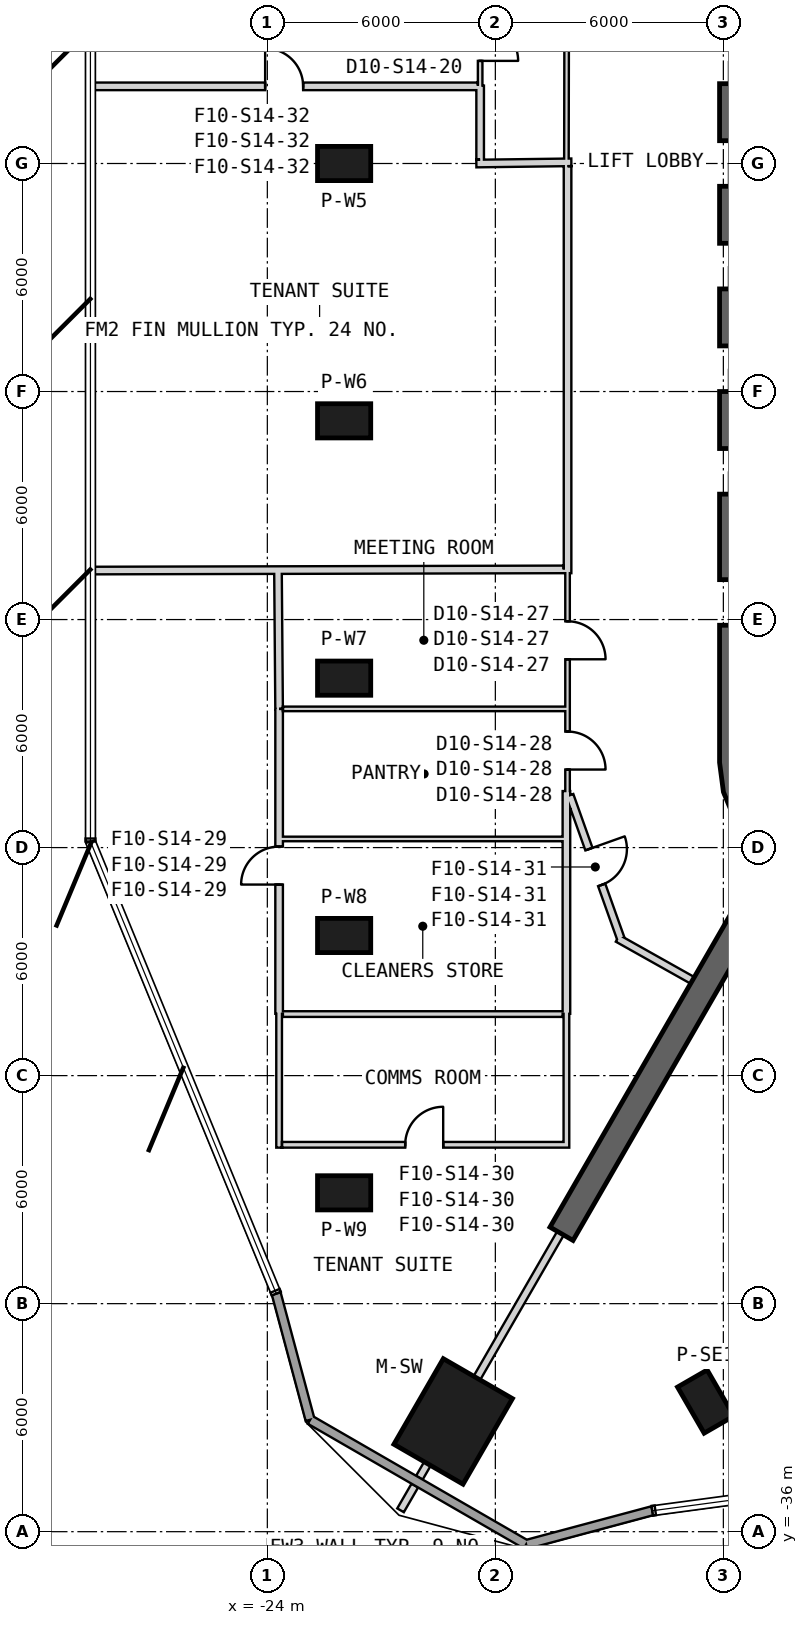
"""IFC4 building model, lengths in metres.
Left out: names, types, materials, properties, quantities, classifications, styles, units other than length and angle.
Written with IfcOpenShell. Run it as: python <this file> out.ifc"""

import sys

from ifc_helpers import new_model, si_unit, direction, frame, frame_2d, origin, origin_2d, place, context, subcontext, project, spatial, polyline, rectangle, outline, extrude, element, fill, save


model = new_model("IFC4")
c1 = context("Model", 3, precision=1e-05, world=origin(), true_north=direction((0.0, 1.0)))
c2 = subcontext(c1, "Body", "Model", "MODEL_VIEW")
j1 = project(units=[si_unit("LENGTHUNIT", "METRE"), si_unit("PLANEANGLEUNIT", "RADIAN")], contexts=[c1])
p1 = place(None, origin())
s1 = spatial("IfcSite", under=j1, at=p1, CompositionType="ELEMENT")
p2 = place(p1, origin())
s2 = spatial("IfcBuilding", under=s1, at=p2, CompositionType="ELEMENT")
p3 = place(p2, frame((0.0, 0.0, 229.2)))
s3 = spatial("IfcBuildingStorey", under=s2, at=p3, CompositionType="ELEMENT", Elevation=229.2)
p4 = place(p3, frame((-19.11, -33.099, 0.0), z_axis=(0.0, 0.0, 1.0), x_axis=(-0.5, -0.866025403784, 0.0)))
e1 = element("IfcColumn", 1, at=p4, inside=s3, PredefinedType="COLUMN", context=c2, shape_type="SweptSolid", body=[
    extrude(rectangle(XDim=2.6, YDim=2.1, at=origin_2d()), origin(), (0.0, 0.0, 1.0), 4.0),
])
for number, where, z_axis, x_axis in (
    (2, (-21.979, 0.0, 0.0), (0.0, 0.0, 1.0), (-1.0, 0.0, 0.0)),
    (3, (-21.979, -6.771, 0.0), (0.0, 0.0, 1.0), (-1.0, 0.0, 0.0)),
    (4, (-21.979, -13.542, 0.0), (0.0, 0.0, 1.0), (-1.0, 0.0, 0.0)),
    (5, (-21.979, -20.313, 0.0), (0.0, 0.0, 1.0), (-1.0, 0.0, 0.0)),
    (6, (-21.979, -27.084, 0.0), (0.0, 0.0, 1.0), (-1.0, 0.0, 0.0)),
    (7, (-12.466, -32.576, 0.0), (0.0, 0.0, 1.0), (0.5, -0.866, 0.0)),
):
    element("IfcColumn", number, at=place(p3, frame(where, z_axis=z_axis, x_axis=x_axis)), inside=s3, PredefinedType="COLUMN", context=c2, shape_type="SweptSolid", body=[
        extrude(rectangle(XDim=1.4, YDim=0.9, at=origin_2d()), origin(), (0.0, 0.0, 1.0), 4.0),
    ])
p5 = place(p3, frame((-11.65, 15.762, 0.0), z_axis=(0.0, 0.0, 1.0), x_axis=(0.0, -1.0, 0.0)))
e8 = element("IfcWall", 8, at=p5, inside=s3, PredefinedType="SHEAR", context=c2, shape_type="SweptSolid", body=[
    extrude(rectangle(XDim=31.523, YDim=0.9, at=frame_2d((15.762, 0.0))), origin(), (0.0, 0.0, 1.0), 4.0),
])
p6 = place(p5, frame((7.062, 0.0, 0.0)))
e9 = element("IfcOpeningElement", 9, at=p6, cuts=e8, PredefinedType="OPENING", context=c2, shape_type="SweptSolid", body=[
    extrude(rectangle(XDim=1.2, YDim=2.4, at=frame_2d((0.6, 1.2))), frame((0.0, 0.46, 0.0), z_axis=(0.0, -1.0, 0.0), x_axis=(1.0, 0.0, 0.0)), (0.0, 0.0, 1.0), 0.92),
])
p7 = place(p5, frame((9.762, 0.0, 0.0)))
e10 = element("IfcOpeningElement", 10, at=p7, cuts=e8, PredefinedType="OPENING", context=c2, shape_type="SweptSolid", body=[
    extrude(rectangle(XDim=1.2, YDim=2.4, at=frame_2d((0.6, 1.2))), frame((0.0, 0.46, 0.0), z_axis=(0.0, -1.0, 0.0), x_axis=(1.0, 0.0, 0.0)), (0.0, 0.0, 1.0), 0.92),
])
p8 = place(p5, frame((12.462, 0.0, 0.0)))
e11 = element("IfcOpeningElement", 11, at=p8, cuts=e8, PredefinedType="OPENING", context=c2, shape_type="SweptSolid", body=[
    extrude(rectangle(XDim=1.2, YDim=2.4, at=frame_2d((0.6, 1.2))), frame((0.0, 0.46, 0.0), z_axis=(0.0, -1.0, 0.0), x_axis=(1.0, 0.0, 0.0)), (0.0, 0.0, 1.0), 0.92),
])
p9 = place(p5, frame((15.162, 0.0, 0.0)))
e12 = element("IfcOpeningElement", 12, at=p9, cuts=e8, PredefinedType="OPENING", context=c2, shape_type="SweptSolid", body=[
    extrude(rectangle(XDim=1.2, YDim=2.4, at=frame_2d((0.6, 1.2))), frame((0.0, 0.46, 0.0), z_axis=(0.0, -1.0, 0.0), x_axis=(1.0, 0.0, 0.0)), (0.0, 0.0, 1.0), 0.92),
])
p10 = place(p5, frame((17.862, 0.0, 0.0)))
e13 = element("IfcOpeningElement", 13, at=p10, cuts=e8, PredefinedType="OPENING", context=c2, shape_type="SweptSolid", body=[
    extrude(rectangle(XDim=1.2, YDim=2.4, at=frame_2d((0.6, 1.2))), frame((0.0, 0.46, 0.0), z_axis=(0.0, -1.0, 0.0), x_axis=(1.0, 0.0, 0.0)), (0.0, 0.0, 1.0), 0.92),
])
p11 = place(p5, frame((20.562, 0.0, 0.0)))
e14 = element("IfcOpeningElement", 14, at=p11, cuts=e8, PredefinedType="OPENING", context=c2, shape_type="SweptSolid", body=[
    extrude(rectangle(XDim=1.2, YDim=2.4, at=frame_2d((0.6, 1.2))), frame((0.0, 0.46, 0.0), z_axis=(0.0, -1.0, 0.0), x_axis=(1.0, 0.0, 0.0)), (0.0, 0.0, 1.0), 0.92),
])
p12 = place(p5, frame((23.262, 0.0, 0.0)))
e15 = element("IfcOpeningElement", 15, at=p12, cuts=e8, PredefinedType="OPENING", context=c2, shape_type="SweptSolid", body=[
    extrude(rectangle(XDim=1.2, YDim=2.4, at=frame_2d((0.6, 1.2))), frame((0.0, 0.46, 0.0), z_axis=(0.0, -1.0, 0.0), x_axis=(1.0, 0.0, 0.0)), (0.0, 0.0, 1.0), 0.92),
])
p13 = place(p5, frame((3.612, 0.0, 0.0)))
e16 = element("IfcOpeningElement", 16, at=p13, cuts=e8, PredefinedType="OPENING", context=c2, shape_type="SweptSolid", body=[
    extrude(rectangle(XDim=1.2, YDim=2.4, at=frame_2d((0.6, 1.2))), frame((0.0, 0.46, 0.0), z_axis=(0.0, -1.0, 0.0), x_axis=(1.0, 0.0, 0.0)), (0.0, 0.0, 1.0), 0.92),
])
p14 = place(p5, frame((26.712, 0.0, 0.0)))
e17 = element("IfcOpeningElement", 17, at=p14, cuts=e8, PredefinedType="OPENING", context=c2, shape_type="SweptSolid", body=[
    extrude(rectangle(XDim=1.2, YDim=2.4, at=frame_2d((0.6, 1.2))), frame((0.0, 0.46, 0.0), z_axis=(0.0, -1.0, 0.0), x_axis=(1.0, 0.0, 0.0)), (0.0, 0.0, 1.0), 0.92),
])
p15 = place(p3, origin())
e18 = element("IfcWall", 18, at=p15, inside=s3, PredefinedType="SHEAR", context=c2, shape_type="SweptSolid", body=[
    extrude(outline(polyline([(-12.1, -15.762), (-11.998, -16.538), (-11.698, -17.262), (-11.221, -17.883), (-10.6, -18.36), (-9.876, -18.659), (-9.1, -18.762), (-8.323, -18.659), (-7.6, -18.36), (-8.05, -17.58), (-8.556, -17.79), (-9.1, -17.862), (-9.644, -17.79), (-10.15, -17.58), (-10.585, -17.247), (-10.919, -16.812), (-11.128, -16.305), (-11.2, -15.762), (-12.1, -15.762)])), origin(), (0.0, 0.0, 1.0), 4.0),
])
p16 = place(p3, frame((-10.575, -18.316, 0.0), z_axis=(0.0, 0.0, 1.0), x_axis=(-0.499996344484, -0.866027514288, 0.0)))
e19 = element("IfcWall", 19, at=p16, inside=s3, PredefinedType="SHEAR", context=c2, shape_type="SweptSolid", body=[
    extrude(rectangle(XDim=11.368, YDim=0.7, at=frame_2d((5.684, 0.0))), origin(), (0.0, 0.0, 1.0), 4.0),
])
p17 = place(p3, frame((-23.765, -29.736, 0.0), z_axis=(0.0, 0.0, 1.0), x_axis=(0.258842571536, -0.965919522093, 0.0)))
e20 = element("IfcWall", 20, at=p17, inside=s3, PredefinedType="SOLIDWALL", context=c2, shape_type="SweptSolid", body=[
    extrude(rectangle(XDim=3.438, YDim=0.24, at=frame_2d((1.719, 0.0))), origin(), (0.0, 0.0, 1.0), 3.7),
])
p18 = place(p3, frame((-22.875, -33.057, 0.0), z_axis=(0.0, 0.0, 1.0), x_axis=(0.866012172048, -0.50002291734, 0.0)))
e21 = element("IfcWall", 21, at=p18, inside=s3, PredefinedType="SOLIDWALL", context=c2, shape_type="SweptSolid", body=[
    extrude(rectangle(XDim=6.565, YDim=0.24, at=frame_2d((3.282, 0.0))), origin(), (0.0, 0.0, 1.0), 3.7),
])
p19 = place(p3, frame((-17.19, -36.339, 0.0), z_axis=(0.0, 0.0, 1.0), x_axis=(0.965919522093, 0.258842571536, 0.0)))
e22 = element("IfcWall", 22, at=p19, inside=s3, PredefinedType="SOLIDWALL", context=c2, shape_type="SweptSolid", body=[
    extrude(rectangle(XDim=3.438, YDim=0.24, at=frame_2d((1.719, 0.0))), origin(), (0.0, 0.0, 1.0), 3.7),
])
p20 = place(p3, frame((-16.1, 16.486, 0.0), z_axis=(0.0, 0.0, 1.0), x_axis=(-0.00180665503, -0.999998367997, 0.0)))
e23 = element("IfcWall", 23, at=p20, inside=s3, PredefinedType="PARTITIONING", context=c2, shape_type="SweptSolid", body=[
    extrude(rectangle(XDim=16.486, YDim=0.12, at=frame_2d((8.243, 0.0))), origin(), (0.0, 0.0, 1.0), 2.88),
])
p21 = place(p20, frame((7.743, 0.0, 0.0)))
e24 = element("IfcOpeningElement", 24, at=p21, cuts=e23, PredefinedType="OPENING", context=c2, shape_type="SweptSolid", body=[
    extrude(rectangle(XDim=1.0, YDim=2.1, at=frame_2d((0.5, 1.05))), frame((0.0, 0.07, 0.0), z_axis=(0.0, -1.0, 0.0), x_axis=(1.0, 0.0, 0.0)), (0.0, 0.0, 1.0), 0.14),
])
p22 = place(p3, frame((-16.1, -10.71, 0.0), z_axis=(0.0, 0.0, 1.0), x_axis=(0.0, -1.0, 0.0)))
e25 = element("IfcWall", 25, at=p22, inside=s3, PredefinedType="PARTITIONING", context=c2, shape_type="SweptSolid", body=[
    extrude(rectangle(XDim=5.803, YDim=0.12, at=frame_2d((2.901, 0.0))), origin(), (0.0, 0.0, 1.0), 2.88),
])
p23 = place(p22, frame((1.335, 0.0, 0.0)))
e26 = element("IfcOpeningElement", 26, at=p23, cuts=e25, PredefinedType="OPENING", context=c2, shape_type="SweptSolid", body=[
    extrude(rectangle(XDim=1.0, YDim=2.1, at=frame_2d((0.5, 1.05))), frame((0.0, 0.07, 0.0), z_axis=(0.0, -1.0, 0.0), x_axis=(1.0, 0.0, 0.0)), (0.0, 0.0, 1.0), 0.14),
])
p24 = place(p22, frame((4.237, 0.0, 0.0)))
e27 = element("IfcOpeningElement", 27, at=p24, cuts=e25, PredefinedType="OPENING", context=c2, shape_type="SweptSolid", body=[
    extrude(rectangle(XDim=1.0, YDim=2.1, at=frame_2d((0.5, 1.05))), frame((0.0, 0.07, 0.0), z_axis=(0.0, -1.0, 0.0), x_axis=(1.0, 0.0, 0.0)), (0.0, 0.0, 1.0), 0.14),
])
p25 = place(p3, frame((-18.4, 4.35, 0.0), z_axis=(0.0, 0.0, 1.0), x_axis=(0.0, -1.0, 0.0)))
e28 = element("IfcWall", 28, at=p25, inside=s3, PredefinedType="PARTITIONING", context=c2, shape_type="SweptSolid", body=[
    extrude(rectangle(XDim=2.3, YDim=0.12, at=frame_2d((1.15, 0.0))), origin(), (0.0, 0.0, 1.0), 3.7),
])
p26 = place(p25, frame((0.65, 0.0, 0.0)))
e29 = element("IfcOpeningElement", 29, at=p26, cuts=e28, PredefinedType="OPENING", context=c2, shape_type="SweptSolid", body=[
    extrude(rectangle(XDim=1.0, YDim=2.1, at=frame_2d((0.5, 1.05))), frame((0.0, 0.07, 0.0), z_axis=(0.0, -1.0, 0.0), x_axis=(1.0, 0.0, 0.0)), (0.0, 0.0, 1.0), 0.14),
])
p27 = place(p3, frame((-18.5, -0.001, 0.0), z_axis=(0.0, 0.0, 1.0), x_axis=(0.999915662945, 0.012987185857, 0.0)))
e30 = element("IfcWall", 30, at=p27, inside=s3, PredefinedType="PARTITIONING", context=c2, shape_type="SweptSolid", body=[
    extrude(rectangle(XDim=2.5, YDim=0.2, at=frame_2d((1.25, 0.0))), origin(), (0.0, 0.0, 1.0), 3.07),
])
p28 = place(p3, frame((-18.4, 2.05, 0.0), z_axis=(0.0, 0.0, 1.0), x_axis=(0.0, -1.0, 0.0)))
e31 = element("IfcWall", 31, at=p28, inside=s3, PredefinedType="PARTITIONING", context=c2, shape_type="SweptSolid", body=[
    extrude(rectangle(XDim=1.95, YDim=0.2, at=frame_2d((0.975, 0.0))), origin(), (0.0, 0.0, 1.0), 3.07),
])
p29 = place(p3, frame((-14.781, -20.389, 0.0), z_axis=(0.0, 0.0, 1.0), x_axis=(0.871979734391, -0.489541972471, 0.0)))
e32 = element("IfcWall", 32, at=p29, inside=s3, PredefinedType="PARTITIONING", context=c2, shape_type="SweptSolid", body=[
    extrude(rectangle(XDim=2.257, YDim=0.2, at=frame_2d((1.128, 0.0))), origin(), (0.0, 0.0, 1.0), 3.7),
])
p30 = place(p3, frame((-16.042, -16.623, 0.0), z_axis=(0.0, 0.0, 1.0), x_axis=(0.335572111171, -0.942014521228, 0.0)))
e33 = element("IfcWall", 33, at=p30, inside=s3, PredefinedType="PARTITIONING", context=c2, shape_type="SweptSolid", body=[
    extrude(rectangle(XDim=4.007, YDim=0.2, at=frame_2d((2.004, 0.0))), origin(), (0.0, 0.0, 1.0), 2.78),
])
p31 = place(p30, frame((1.504, 0.0, 0.0)))
e34 = element("IfcOpeningElement", 34, at=p31, cuts=e33, PredefinedType="OPENING", context=c2, shape_type="SweptSolid", body=[
    extrude(rectangle(XDim=1.0, YDim=2.1, at=frame_2d((0.5, 1.05))), frame((0.0, 0.11, 0.0), z_axis=(0.0, -1.0, 0.0), x_axis=(1.0, 0.0, 0.0)), (0.0, 0.0, 1.0), 0.22),
])
p32 = place(p3, frame((-16.1, -0.07, 0.0), z_axis=(0.0, 0.0, 1.0), x_axis=(0.0, -1.0, 0.0)))
e35 = element("IfcWall", 35, at=p32, inside=s3, PredefinedType="PARTITIONING", context=c2, shape_type="SweptSolid", body=[
    extrude(rectangle(XDim=10.71, YDim=0.2, at=frame_2d((5.355, 0.0))), origin(), (0.0, 0.0, 1.0), 2.98),
])
p33 = place(p3, frame((-28.655, 2.03, 0.0), z_axis=(0.0, 0.0, 1.0), x_axis=(1.0, 0.0, 0.0)))
e36 = element("IfcWall", 36, at=p33, inside=s3, PredefinedType="PARTITIONING", context=c2, shape_type="SweptSolid", body=[
    extrude(rectangle(XDim=10.195, YDim=0.2, at=frame_2d((5.098, 0.0))), origin(), (0.0, 0.0, 1.0), 3.7),
])
p34 = place(p33, frame((4.598, 0.0, 0.0)))
e37 = element("IfcOpeningElement", 37, at=p34, cuts=e36, PredefinedType="OPENING", context=c2, shape_type="SweptSolid", body=[
    extrude(rectangle(XDim=1.0, YDim=2.1, at=frame_2d((0.5, 1.05))), frame((0.0, 0.11, 0.0), z_axis=(0.0, -1.0, 0.0), x_axis=(1.0, 0.0, 0.0)), (0.0, 0.0, 1.0), 0.22),
])
p35 = place(p3, frame((-28.654, -10.711, 0.0), z_axis=(0.0, 0.0, 1.0), x_axis=(0.999996949666, 0.002469951104, 0.0)))
e38 = element("IfcWall", 38, at=p35, inside=s3, PredefinedType="PARTITIONING", context=c2, shape_type="SweptSolid", body=[
    extrude(rectangle(XDim=12.454, YDim=0.2, at=frame_2d((6.227, 0.0))), origin(), (0.0, 0.0, 1.0), 2.98),
])
p36 = place(p3, frame((-16.285, -28.146, 0.0), z_axis=(0.0, 0.0, 1.0), x_axis=(-0.499992938033, -0.866029480975, 0.0)))
e39 = element("IfcWall", 39, at=p36, inside=s3, PredefinedType="PARTITIONING", context=c2, shape_type="SweptSolid", body=[
    extrude(rectangle(XDim=4.401, YDim=0.2, at=frame_2d((2.201, 0.0))), origin(), (0.0, 0.0, 1.0), 3.27),
])
p37 = place(p3, frame((-19.786, -34.21, 0.0), z_axis=(0.0, 0.0, 1.0), x_axis=(-0.50001992892, -0.866013897511, 0.0)))
e40 = element("IfcWall", 40, at=p37, inside=s3, PredefinedType="PARTITIONING", context=c2, shape_type="SweptSolid", body=[
    extrude(rectangle(XDim=0.426, YDim=0.2, at=frame_2d((0.213, 0.0))), origin(), (0.0, 0.0, 1.0), 3.7),
])
p38 = place(p3, frame((-20.119, -34.787, 0.0), z_axis=(0.0, 0.0, 1.0), x_axis=(-0.500088105676, -0.865974529972, 0.0)))
e41 = element("IfcWall", 41, at=p38, inside=s3, PredefinedType="PARTITIONING", context=c2, shape_type="SweptSolid", body=[
    extrude(rectangle(XDim=0.751, YDim=0.2, at=frame_2d((0.375, 0.0))), origin(), (0.0, 0.0, 1.0), 3.7),
])
p39 = place(p3, frame((-23.69, -14.351, 0.0), z_axis=(0.0, 0.0, 1.0), x_axis=(-0.008048698241, 0.999967608704, 0.0)))
e42 = element("IfcWall", 42, at=p39, inside=s3, PredefinedType="PARTITIONING", context=c2, shape_type="SweptSolid", body=[
    extrude(rectangle(XDim=3.67, YDim=0.2, at=frame_2d((1.835, 0.0))), origin(), (0.0, 0.0, 1.0), 3.7),
])
p40 = place(p3, frame((-23.69, -22.373, 0.0), z_axis=(0.0, 0.0, 1.0), x_axis=(0.0, 1.0, 0.0)))
e43 = element("IfcWall", 43, at=p40, inside=s3, PredefinedType="PARTITIONING", context=c2, shape_type="SweptSolid", body=[
    extrude(rectangle(XDim=4.6, YDim=0.2, at=frame_2d((2.3, 0.0))), origin(), (0.0, 0.0, 1.0), 3.7),
])
p41 = place(p40, frame((3.4, 0.0, 0.0)))
e44 = element("IfcOpeningElement", 44, at=p41, cuts=e43, PredefinedType="OPENING", context=c2, shape_type="SweptSolid", body=[
    extrude(rectangle(XDim=1.0, YDim=2.1, at=frame_2d((0.5, 1.05))), frame((0.0, 0.11, 0.0), z_axis=(0.0, -1.0, 0.0), x_axis=(1.0, 0.0, 0.0)), (0.0, 0.0, 1.0), 0.22),
])
p42 = place(p3, frame((-23.69, -17.773, 0.0), z_axis=(0.0, 0.0, 1.0), x_axis=(0.0, 1.0, 0.0)))
e45 = element("IfcWall", 45, at=p42, inside=s3, PredefinedType="PARTITIONING", context=c2, shape_type="SweptSolid", body=[
    extrude(rectangle(XDim=3.422, YDim=0.2, at=frame_2d((1.711, 0.0))), origin(), (0.0, 0.0, 1.0), 3.7),
])
p43 = place(p3, frame((-16.13, -22.373, 0.0), z_axis=(0.0, 0.0, 1.0), x_axis=(0.0, 1.0, 0.0)))
e46 = element("IfcWall", 46, at=p43, inside=s3, PredefinedType="PARTITIONING", context=c2, shape_type="SweptSolid", body=[
    extrude(rectangle(XDim=4.6, YDim=0.2, at=frame_2d((2.3, 0.0))), origin(), (0.0, 0.0, 1.0), 2.78),
])
p44 = place(p3, frame((-16.13, -17.773, 0.0), z_axis=(0.0, 0.0, 1.0), x_axis=(0.0, 1.0, 0.0)))
e47 = element("IfcWall", 47, at=p44, inside=s3, PredefinedType="PARTITIONING", context=c2, shape_type="SweptSolid", body=[
    extrude(rectangle(XDim=1.26, YDim=0.2, at=frame_2d((0.63, 0.0))), origin(), (0.0, 0.0, 1.0), 3.7),
])
p45 = place(p3, frame((-23.69, -25.895, 0.0), z_axis=(0.0, 0.0, 1.0), x_axis=(0.0, 1.0, 0.0)))
e48 = element("IfcWall", 48, at=p45, inside=s3, PredefinedType="PLUMBINGWALL", context=c2, shape_type="SweptSolid", body=[
    extrude(rectangle(XDim=3.522, YDim=0.15, at=frame_2d((1.761, 0.0))), origin(), (0.0, 0.0, 1.0), 3.7),
])
p46 = place(p3, frame((-23.615, -25.82, 0.0), z_axis=(0.0, 0.0, 1.0), x_axis=(1.0, 0.0, 0.0)))
e49 = element("IfcWall", 49, at=p46, inside=s3, PredefinedType="PLUMBINGWALL", context=c2, shape_type="SweptSolid", body=[
    extrude(rectangle(XDim=7.56, YDim=0.15, at=frame_2d((3.78, 0.0))), origin(), (0.0, 0.0, 1.0), 2.78),
])
p47 = place(p46, frame((3.242, 0.0, 0.0)))
e50 = element("IfcOpeningElement", 50, at=p47, cuts=e49, PredefinedType="OPENING", context=c2, shape_type="SweptSolid", body=[
    extrude(rectangle(XDim=1.0, YDim=2.1, at=frame_2d((0.5, 1.05))), frame((0.0, 0.085, 0.0), z_axis=(0.0, -1.0, 0.0), x_axis=(1.0, 0.0, 0.0)), (0.0, 0.0, 1.0), 0.17),
])
p48 = place(p3, frame((-16.13, -25.745, 0.0), z_axis=(0.0, 0.0, 1.0), x_axis=(0.0, 1.0, 0.0)))
e51 = element("IfcWall", 51, at=p48, inside=s3, PredefinedType="PLUMBINGWALL", context=c2, shape_type="SweptSolid", body=[
    extrude(rectangle(XDim=3.372, YDim=0.15, at=frame_2d((1.686, 0.0))), origin(), (0.0, 0.0, 1.0), 3.7),
])
p49 = place(p3, frame((-23.59, -14.351, 0.0), z_axis=(0.0, 0.0, 1.0), x_axis=(1.0, 0.0, 0.0)))
e52 = element("IfcWall", 52, at=p49, inside=s3, PredefinedType="PARTITIONING", context=c2, shape_type="SweptSolid", body=[
    extrude(rectangle(XDim=7.46, YDim=0.12, at=frame_2d((3.73, 0.0))), origin(), (0.0, 0.0, 1.0), 3.7),
])
p50 = place(p3, frame((-16.23, -17.773, 0.0), z_axis=(0.0, 0.0, 1.0), x_axis=(-1.0, 0.0, 0.0)))
e53 = element("IfcWall", 53, at=p50, inside=s3, PredefinedType="PARTITIONING", context=c2, shape_type="SweptSolid", body=[
    extrude(rectangle(XDim=7.36, YDim=0.12, at=frame_2d((3.68, 0.0))), origin(), (0.0, 0.0, 1.0), 2.88),
])
p51 = place(p3, frame((-23.59, -22.38, 0.0), z_axis=(0.0, 0.0, 1.0), x_axis=(1.0, 0.0, 0.0)))
e54 = element("IfcWall", 54, at=p51, inside=s3, PredefinedType="PLUMBINGWALL", context=c2, shape_type="SweptSolid", body=[
    extrude(rectangle(XDim=7.36, YDim=0.15, at=frame_2d((3.68, 0.0))), origin(), (0.0, 0.0, 1.0), 2.78),
])
p52 = place(p26, origin())
e55 = element("IfcDoor", 55, at=p52, inside=s3, OperationType="SINGLE_SWING_RIGHT", PredefinedType="NOTDEFINED", context=c2, shape_type="SweptSolid", body=[
    extrude(rectangle(XDim=1.0, YDim=2.1, at=frame_2d((0.5, 1.05))), frame((0.0, 0.025, 0.0), z_axis=(0.0, -1.0, 0.0), x_axis=(1.0, 0.0, 0.0)), (0.0, 0.0, 1.0), 0.05),
])
fill(e29, e55)
p53 = place(p23, origin())
e56 = element("IfcDoor", 56, at=p53, inside=s3, OperationType="SINGLE_SWING_LEFT", PredefinedType="NOTDEFINED", context=c2, shape_type="SweptSolid", body=[
    extrude(rectangle(XDim=1.0, YDim=2.1, at=frame_2d((0.5, 1.05))), frame((0.0, 0.025, 0.0), z_axis=(0.0, -1.0, 0.0), x_axis=(1.0, 0.0, 0.0)), (0.0, 0.0, 1.0), 0.05),
])
fill(e26, e56)
p54 = place(p24, origin())
e57 = element("IfcDoor", 57, at=p54, inside=s3, OperationType="SINGLE_SWING_RIGHT", PredefinedType="NOTDEFINED", context=c2, shape_type="SweptSolid", body=[
    extrude(rectangle(XDim=1.0, YDim=2.1, at=frame_2d((0.5, 1.05))), frame((0.0, 0.025, 0.0), z_axis=(0.0, -1.0, 0.0), x_axis=(1.0, 0.0, 0.0)), (0.0, 0.0, 1.0), 0.05),
])
fill(e27, e57)
p55 = place(p41, origin())
e58 = element("IfcDoor", 58, at=p55, inside=s3, OperationType="SINGLE_SWING_RIGHT", PredefinedType="USERDEFINED", context=c2, shape_type="SweptSolid", body=[
    extrude(rectangle(XDim=1.0, YDim=2.1, at=frame_2d((0.5, 1.05))), frame((0.0, 0.025, 0.0), z_axis=(0.0, -1.0, 0.0), x_axis=(1.0, 0.0, 0.0)), (0.0, 0.0, 1.0), 0.05),
])
fill(e44, e58)
p56 = place(p47, origin())
e59 = element("IfcDoor", 59, at=p56, inside=s3, OperationType="SINGLE_SWING_RIGHT", PredefinedType="USERDEFINED", context=c2, shape_type="SweptSolid", body=[
    extrude(rectangle(XDim=1.0, YDim=2.1, at=frame_2d((0.5, 1.05))), frame((0.0, 0.025, 0.0), z_axis=(0.0, -1.0, 0.0), x_axis=(1.0, 0.0, 0.0)), (0.0, 0.0, 1.0), 0.05),
])
fill(e50, e59)
p57 = place(p31, origin())
e60 = element("IfcDoor", 60, at=p57, inside=s3, OperationType="SINGLE_SWING_LEFT", PredefinedType="USERDEFINED", context=c2, shape_type="SweptSolid", body=[
    extrude(rectangle(XDim=1.0, YDim=2.1, at=frame_2d((0.5, 1.05))), frame((0.0, 0.025, 0.0), z_axis=(0.0, -1.0, 0.0), x_axis=(1.0, 0.0, 0.0)), (0.0, 0.0, 1.0), 0.05),
])
fill(e34, e60)
p58 = place(p34, origin())
e61 = element("IfcDoor", 61, at=p58, inside=s3, OperationType="SINGLE_SWING_LEFT", PredefinedType="USERDEFINED", context=c2, shape_type="SweptSolid", body=[
    extrude(rectangle(XDim=1.0, YDim=2.1, at=frame_2d((0.5, 1.05))), frame((0.0, 0.025, 0.0), z_axis=(0.0, -1.0, 0.0), x_axis=(1.0, 0.0, 0.0)), (0.0, 0.0, 1.0), 0.05),
])
fill(e37, e61)
save(model, sys.argv[1])
